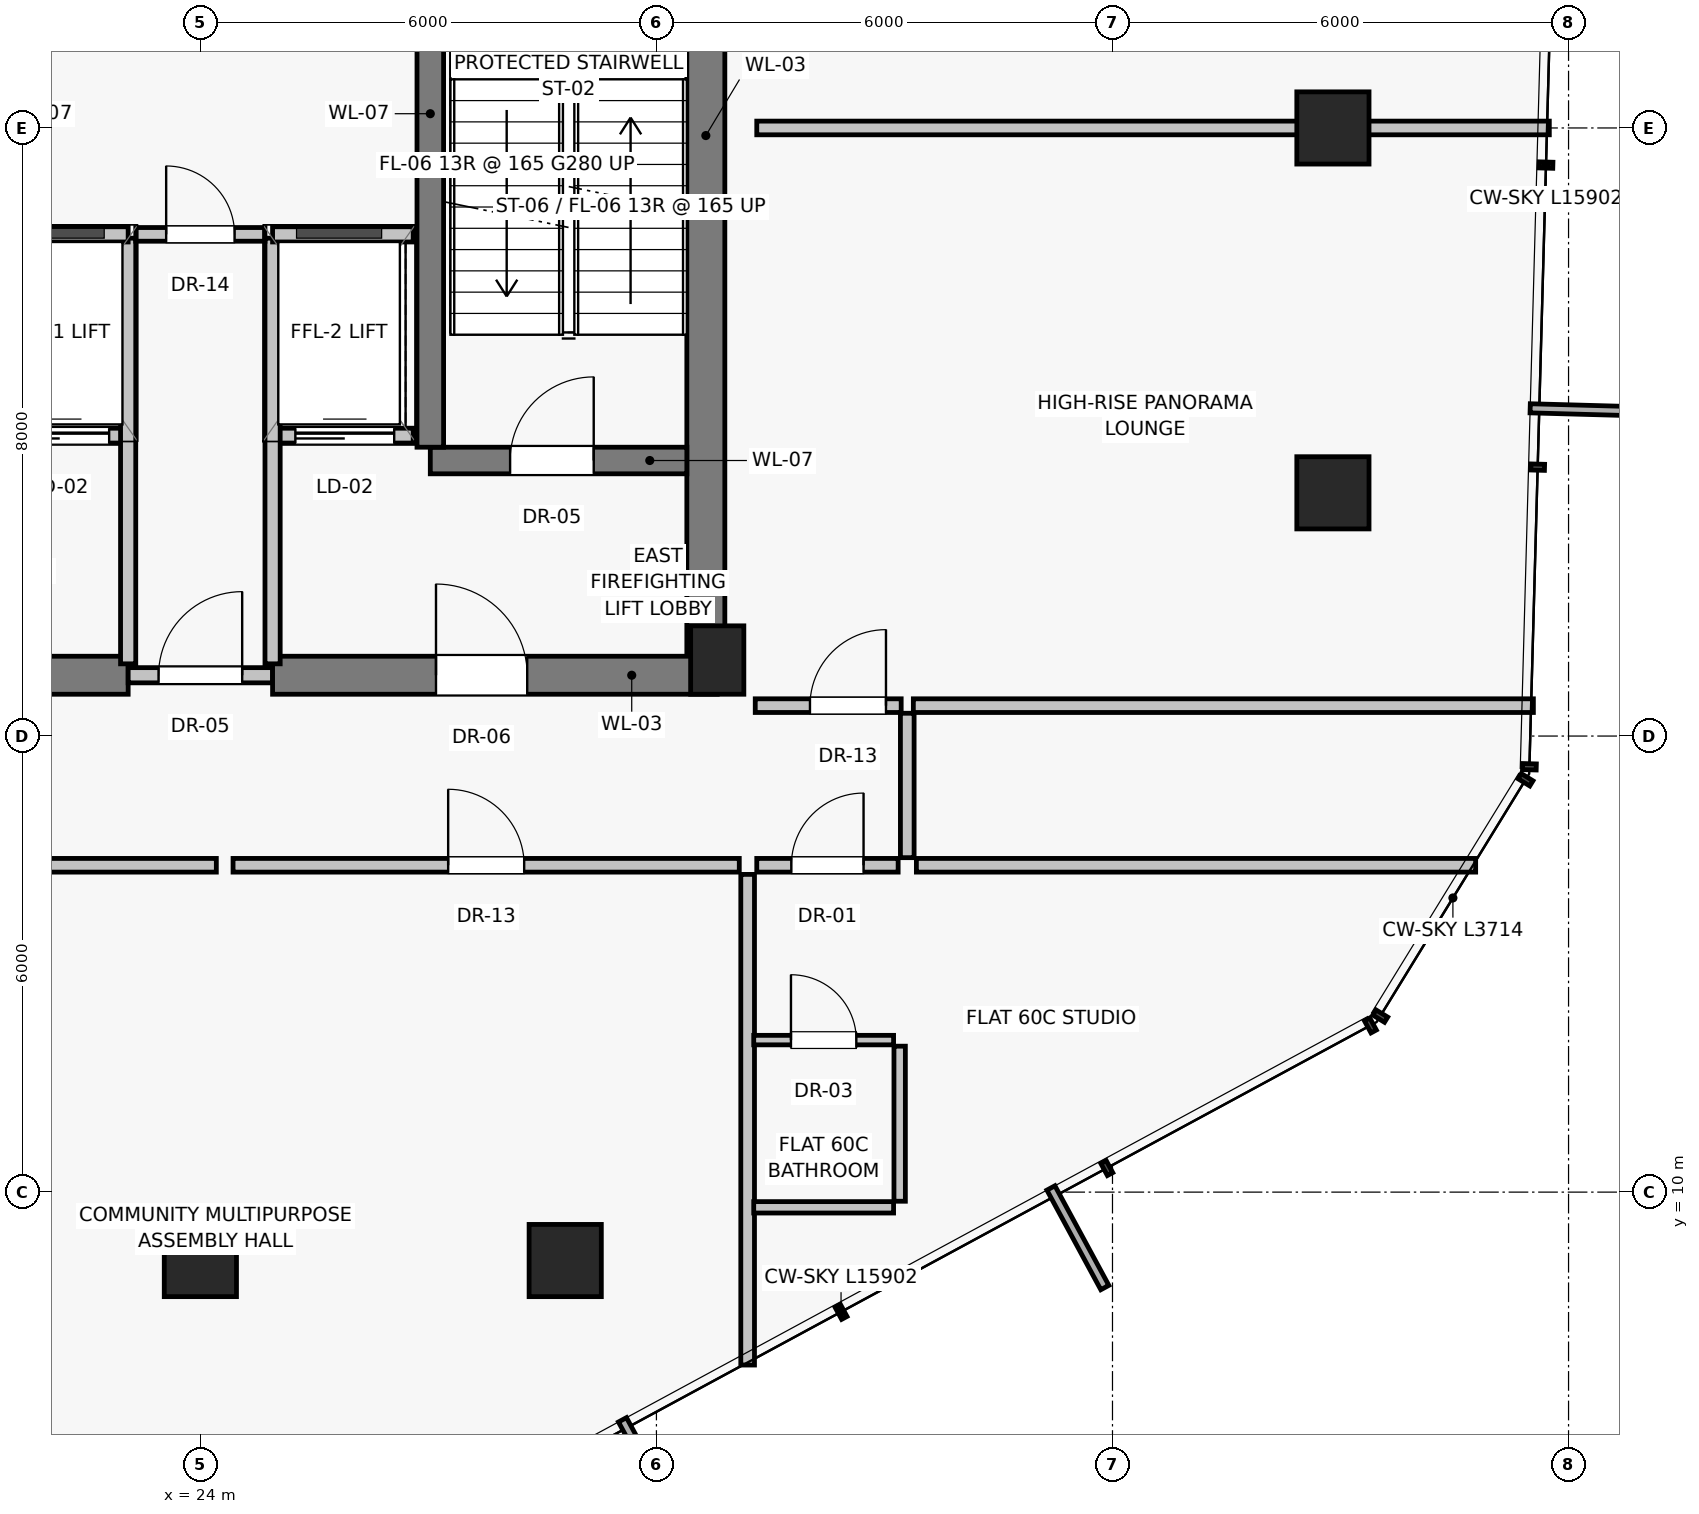
"""IFC4 building model, lengths in metres.
Left out: names, types, materials, properties, quantities, classifications, styles, units other than length and angle.
Written with IfcOpenShell. Run it as: python <this file> out.ifc"""

import sys

from ifc_helpers import new_model, si_unit, direction, frame, frame_2d, origin, origin_2d, place, context, subcontext, project, spatial, rectangle, extrude, source, transform, mapped, element, fill, save


model = new_model("IFC4")
c1 = context("Model", 3, precision=1e-05, world=origin(), true_north=direction((0.0, 1.0)))
c2 = subcontext(c1, "Body", "Model", "MODEL_VIEW")
j1 = project(units=[si_unit("LENGTHUNIT", "METRE"), si_unit("PLANEANGLEUNIT", "RADIAN")], contexts=[c1])
p1 = place(None, origin())
s1 = spatial("IfcSite", under=j1, at=p1, CompositionType="ELEMENT")
p2 = place(p1, origin())
s2 = spatial("IfcBuilding", under=s1, at=p2, CompositionType="ELEMENT")
p3 = place(p2, frame((0.0, 0.0, 211.35)))
s3 = spatial("IfcBuildingStorey", under=s2, at=p3, CompositionType="ELEMENT", Elevation=211.35)
p4 = place(p3, frame((30.8, 17.0, 0.0), z_axis=(0.0, 0.0, 1.0), x_axis=(1.0, 0.0, 0.0)))
e1 = element("IfcColumn", 1, at=p4, inside=s3, PredefinedType="PILASTER", context=c2, shape_type="SweptSolid", body=[
    extrude(rectangle(XDim=0.7, YDim=0.9, at=origin_2d()), origin(), (0.0, 0.0, 1.0), 4.3),
])
for number, where, z_axis, x_axis in (
    (2, (38.9, 19.2, 0.0), (0.0, 0.0, 1.0), (1.0, 0.0, 0.0)),
    (3, (38.9, 24.0, 0.0), (0.0, 0.0, 1.0), (1.0, 0.0, 0.0)),
    (4, (24.0, 9.1, 0.0), (0.0, 0.0, 1.0), (1.0, 0.0, 0.0)),
    (5, (28.8, 9.1, 0.0), (0.0, 0.0, 1.0), (1.0, 0.0, 0.0)),
):
    element("IfcColumn", number, at=place(p3, frame(where, z_axis=z_axis, x_axis=x_axis)), inside=s3, PredefinedType="COLUMN", context=c2, shape_type="SweptSolid", body=[
        extrude(rectangle(XDim=0.95, YDim=0.95, at=origin_2d()), origin(), (0.0, 0.0, 1.0), 4.3),
    ])
p5 = place(p3, frame((30.65, 16.8, 0.0), z_axis=(0.0, 0.0, 1.0), x_axis=(0.0, 1.0, 0.0)))
e6 = element("IfcWall", 6, at=p5, inside=s3, PredefinedType="SHEAR", context=c2, shape_type="SweptSolid", body=[
    extrude(rectangle(XDim=14.2, YDim=0.5, at=frame_2d((7.1, 0.0))), origin(), (0.0, 0.0, 1.0), 4.065),
])
p6 = place(p3, frame((17.2, 16.8, 0.0), z_axis=(0.0, 0.0, 1.0), x_axis=(1.0, 0.0, 0.0)))
e7 = element("IfcWall", 7, at=p6, inside=s3, PredefinedType="SHEAR", context=c2, shape_type="SweptSolid", body=[
    extrude(rectangle(XDim=5.85, YDim=0.5, at=frame_2d((2.925, 0.0))), origin(), (0.0, 0.0, 1.0), 4.065),
])
p7 = place(p6, frame((1.15, 0.0, 0.0)))
e8 = element("IfcOpeningElement", 8, at=p7, cuts=e7, PredefinedType="OPENING", context=c2, shape_type="SweptSolid", body=[
    extrude(rectangle(XDim=1.2, YDim=2.03, at=frame_2d((0.6, 1.015))), frame((0.0, 0.26, 0.0), z_axis=(0.0, -1.0, 0.0), x_axis=(1.0, 0.0, 0.0)), (0.0, 0.0, 1.0), 0.52),
])
p8 = place(p3, frame((23.05, 16.8, 0.0), z_axis=(0.0, 0.0, 1.0), x_axis=(1.0, 0.0, 0.0)))
e9 = element("IfcWall", 9, at=p8, inside=s3, PredefinedType="SOLIDWALL", context=c2, shape_type="SweptSolid", body=[
    extrude(rectangle(XDim=1.9, YDim=0.2, at=frame_2d((0.95, 0.0))), origin(), (0.0, 0.0, 1.0), 3.215),
])
p9 = place(p8, frame((0.4, 0.0, 0.0)))
e10 = element("IfcOpeningElement", 10, at=p9, cuts=e9, PredefinedType="OPENING", context=c2, shape_type="SweptSolid", body=[
    extrude(rectangle(XDim=1.1, YDim=2.03, at=frame_2d((0.55, 1.015))), frame((0.0, 0.11, 0.0), z_axis=(0.0, -1.0, 0.0), x_axis=(1.0, 0.0, 0.0)), (0.0, 0.0, 1.0), 0.22),
])
p10 = place(p3, frame((24.95, 16.8, 0.0), z_axis=(0.0, 0.0, 1.0), x_axis=(1.0, 0.0, 0.0)))
e11 = element("IfcWall", 11, at=p10, inside=s3, PredefinedType="SHEAR", context=c2, shape_type="SweptSolid", body=[
    extrude(rectangle(XDim=5.85, YDim=0.5, at=frame_2d((2.925, 0.0))), origin(), (0.0, 0.0, 1.0), 4.065),
])
p11 = place(p10, frame((2.15, 0.0, 0.0)))
e12 = element("IfcOpeningElement", 12, at=p11, cuts=e11, PredefinedType="OPENING", context=c2, shape_type="SweptSolid", body=[
    extrude(rectangle(XDim=1.2, YDim=2.03, at=frame_2d((0.6, 1.015))), frame((0.0, 0.26, 0.0), z_axis=(0.0, -1.0, 0.0), x_axis=(1.0, 0.0, 0.0)), (0.0, 0.0, 1.0), 0.52),
])
p12 = place(p3, frame((21.2, 19.95, 0.0), z_axis=(0.0, 0.0, 1.0), x_axis=(1.0, 0.0, 0.0)))
e13 = element("IfcWall", 13, at=p12, inside=s3, PredefinedType="SOLIDWALL", context=c2, shape_type="SweptSolid", body=[
    extrude(rectangle(XDim=1.85, YDim=0.2, at=frame_2d((0.925, 0.0))), origin(), (0.0, 0.0, 1.0), 4.065),
])
p13 = place(p12, frame((0.3, 0.0, 0.0)))
e14 = element("IfcOpeningElement", 14, at=p13, cuts=e13, PredefinedType="OPENING", context=c2, shape_type="SweptSolid", body=[
    extrude(rectangle(XDim=1.3, YDim=2.25, at=frame_2d((0.65, 1.125))), frame((0.0, 0.11, 0.0), z_axis=(0.0, -1.0, 0.0), x_axis=(1.0, 0.0, 0.0)), (0.0, 0.0, 1.0), 0.22),
])
p14 = place(p3, frame((24.95, 19.95, 0.0), z_axis=(0.0, 0.0, 1.0), x_axis=(1.0, 0.0, 0.0)))
e15 = element("IfcWall", 15, at=p14, inside=s3, PredefinedType="SOLIDWALL", context=c2, shape_type="SweptSolid", body=[
    extrude(rectangle(XDim=1.85, YDim=0.2, at=frame_2d((0.925, 0.0))), origin(), (0.0, 0.0, 1.0), 4.065),
])
p15 = place(p14, frame((0.3, 0.0, 0.0)))
e16 = element("IfcOpeningElement", 16, at=p15, cuts=e15, PredefinedType="OPENING", context=c2, shape_type="SweptSolid", body=[
    extrude(rectangle(XDim=1.3, YDim=2.25, at=frame_2d((0.65, 1.125))), frame((0.0, 0.11, 0.0), z_axis=(0.0, -1.0, 0.0), x_axis=(1.0, 0.0, 0.0)), (0.0, 0.0, 1.0), 0.22),
])
p16 = place(p3, frame((27.025, 19.625, 0.0), z_axis=(0.0, 0.0, 1.0), x_axis=(1.0, 0.0, 0.0)))
e17 = element("IfcWall", 17, at=p16, inside=s3, PredefinedType="SHEAR", context=c2, shape_type="SweptSolid", body=[
    extrude(rectangle(XDim=3.375, YDim=0.35, at=frame_2d((1.688, 0.0))), origin(), (0.0, 0.0, 1.0), 4.065),
])
p17 = place(p16, frame((1.05, 0.0, 0.0)))
e18 = element("IfcOpeningElement", 18, at=p17, cuts=e17, PredefinedType="OPENING", context=c2, shape_type="SweptSolid", body=[
    extrude(rectangle(XDim=1.1, YDim=2.03, at=frame_2d((0.55, 1.015))), frame((0.0, 0.185, 0.0), z_axis=(0.0, -1.0, 0.0), x_axis=(1.0, 0.0, 0.0)), (0.0, 0.0, 1.0), 0.37),
])
p18 = place(p3, frame((27.025, 19.8, 0.0), z_axis=(0.0, 0.0, 1.0), x_axis=(0.0, 1.0, 0.0)))
e19 = element("IfcWall", 19, at=p18, inside=s3, PredefinedType="SHEAR", context=c2, shape_type="SweptSolid", body=[
    extrude(rectangle(XDim=8.775, YDim=0.35, at=frame_2d((4.387, 0.0))), origin(), (0.0, 0.0, 1.0), 4.065),
])
for number, where, z_axis, x_axis in (
    (20, (23.05, 16.95, 0.0), (0.0, 0.0, 1.0), (0.0, 1.0, 0.0)),
    (21, (24.95, 16.95, 0.0), (0.0, 0.0, 1.0), (0.0, 1.0, 0.0)),
):
    element("IfcWall", number, at=place(p3, frame(where, z_axis=z_axis, x_axis=x_axis)), inside=s3, PredefinedType="SOLIDWALL", context=c2, shape_type="SweptSolid", body=[
        extrude(rectangle(XDim=5.6, YDim=0.2, at=frame_2d((2.8, 0.0))), origin(), (0.0, 0.0, 1.0), 4.065),
    ])
for number, where, z_axis, x_axis in (
    (22, (21.2, 22.6, 0.0), (0.0, 0.0, 1.0), (1.0, 0.0, 0.0)),
    (23, (24.95, 22.6, 0.0), (0.0, 0.0, 1.0), (1.0, 0.0, 0.0)),
):
    element("IfcWall", number, at=place(p3, frame(where, z_axis=z_axis, x_axis=x_axis)), inside=s3, PredefinedType="SOLIDWALL", context=c2, shape_type="SweptSolid", body=[
        extrude(rectangle(XDim=1.85, YDim=0.2, at=frame_2d((0.925, 0.0))), origin(), (0.0, 0.0, 1.0), 4.065),
    ])
p19 = place(p3, frame((23.15, 22.6, 0.0), z_axis=(0.0, 0.0, 1.0), x_axis=(1.0, 0.0, 0.0)))
e24 = element("IfcWall", 24, at=p19, inside=s3, PredefinedType="PARTITIONING", context=c2, shape_type="SweptSolid", body=[
    extrude(rectangle(XDim=1.7, YDim=0.18, at=frame_2d((0.85, 0.0))), origin(), (0.0, 0.0, 1.0), 4.065),
])
p20 = place(p19, frame((0.4, 0.0, 0.0)))
e25 = element("IfcOpeningElement", 25, at=p20, cuts=e24, PredefinedType="OPENING", context=c2, shape_type="SweptSolid", body=[
    extrude(rectangle(XDim=0.9, YDim=2.01, at=frame_2d((0.45, 1.005))), frame((0.0, 0.1, 0.0), z_axis=(0.0, -1.0, 0.0), x_axis=(1.0, 0.0, 0.0)), (0.0, 0.0, 1.0), 0.2),
])
p21 = place(p3, frame((31.2, 14.18, 0.0), z_axis=(0.0, 0.0, 1.0), x_axis=(0.0, -1.0, 0.0)))
e26 = element("IfcWall", 26, at=p21, inside=s3, PredefinedType="PARTITIONING", context=c2, shape_type="SweptSolid", body=[
    extrude(rectangle(XDim=6.455, YDim=0.18, at=frame_2d((3.228, 0.0))), origin(), (0.0, 0.0, 1.0), 4.065),
])
p22 = place(p3, frame((15.31, 14.3, 0.0), z_axis=(0.0, 0.0, 1.0), x_axis=(1.0, 0.0, 0.0)))
e27 = element("IfcWall", 27, at=p22, inside=s3, PredefinedType="PARTITIONING", context=c2, shape_type="SweptSolid", body=[
    extrude(rectangle(XDim=8.9, YDim=0.18, at=frame_2d((4.45, 0.0))), origin(), (0.0, 0.0, 1.0), 4.065),
])
p23 = place(p22, frame((3.55, 0.0, 0.0)))
e28 = element("IfcOpeningElement", 28, at=p23, cuts=e27, PredefinedType="OPENING", context=c2, shape_type="SweptSolid", body=[
    extrude(rectangle(XDim=1.8, YDim=2.25, at=frame_2d((0.9, 1.125))), frame((0.0, 0.1, 0.0), z_axis=(0.0, -1.0, 0.0), x_axis=(1.0, 0.0, 0.0)), (0.0, 0.0, 1.0), 0.2),
])
p24 = place(p3, frame((24.43, 14.3, 0.0), z_axis=(0.0, 0.0, 1.0), x_axis=(1.0, 0.0, 0.0)))
e29 = element("IfcWall", 29, at=p24, inside=s3, PredefinedType="PARTITIONING", context=c2, shape_type="SweptSolid", body=[
    extrude(rectangle(XDim=6.66, YDim=0.18, at=frame_2d((3.33, 0.0))), origin(), (0.0, 0.0, 1.0), 4.065),
])
p25 = place(p24, frame((2.83, 0.0, 0.0)))
e30 = element("IfcOpeningElement", 30, at=p25, cuts=e29, PredefinedType="OPENING", context=c2, shape_type="SweptSolid", body=[
    extrude(rectangle(XDim=1.0, YDim=2.01, at=frame_2d((0.5, 1.005))), frame((0.0, 0.1, 0.0), z_axis=(0.0, -1.0, 0.0), x_axis=(1.0, 0.0, 0.0)), (0.0, 0.0, 1.0), 0.2),
])
p26 = place(p3, frame((31.32, 24.0, 0.0), z_axis=(0.0, 0.0, 1.0), x_axis=(1.0, 0.0, 0.0)))
e31 = element("IfcWall", 31, at=p26, inside=s3, PredefinedType="PARTITIONING", context=c2, shape_type="SweptSolid", body=[
    extrude(rectangle(XDim=10.427, YDim=0.18, at=frame_2d((5.213, 0.0))), origin(), (0.0, 0.0, 1.0), 4.065),
])
p27 = place(p3, frame((33.3, 14.4, 0.0), z_axis=(0.0, 0.0, 1.0), x_axis=(0.0, 1.0, 0.0)))
e32 = element("IfcWall", 32, at=p27, inside=s3, PredefinedType="PARTITIONING", context=c2, shape_type="SweptSolid", body=[
    extrude(rectangle(XDim=1.9, YDim=0.18, at=frame_2d((0.95, 0.0))), origin(), (0.0, 0.0, 1.0), 4.065),
])
p28 = place(p3, frame((31.3, 16.4, 0.0), z_axis=(0.0, 0.0, 1.0), x_axis=(1.0, 0.0, 0.0)))
e33 = element("IfcWall", 33, at=p28, inside=s3, PredefinedType="PARTITIONING", context=c2, shape_type="SweptSolid", body=[
    extrude(rectangle(XDim=1.92, YDim=0.18, at=frame_2d((0.96, 0.0))), origin(), (0.0, 0.0, 1.0), 4.065),
])
p29 = place(p28, frame((0.72, 0.0, 0.0)))
e34 = element("IfcOpeningElement", 34, at=p29, cuts=e33, PredefinedType="OPENING", context=c2, shape_type="SweptSolid", body=[
    extrude(rectangle(XDim=1.0, YDim=2.01, at=frame_2d((0.5, 1.005))), frame((0.0, 0.1, 0.0), z_axis=(0.0, -1.0, 0.0), x_axis=(1.0, 0.0, 0.0)), (0.0, 0.0, 1.0), 0.2),
])
p30 = place(p3, frame((33.38, 16.4, 0.0), z_axis=(0.0, 0.0, 1.0), x_axis=(1.0, 0.0, 0.0)))
e35 = element("IfcWall", 35, at=p30, inside=s3, PredefinedType="PARTITIONING", context=c2, shape_type="SweptSolid", body=[
    extrude(rectangle(XDim=8.157, YDim=0.18, at=frame_2d((4.079, 0.0))), origin(), (0.0, 0.0, 1.0), 4.065),
])
p31 = place(p3, frame((33.42, 14.3, 0.0), z_axis=(0.0, 0.0, 1.0), x_axis=(1.0, 0.0, 0.0)))
e36 = element("IfcWall", 36, at=p31, inside=s3, PredefinedType="PARTITIONING", context=c2, shape_type="SweptSolid", body=[
    extrude(rectangle(XDim=7.358, YDim=0.18, at=frame_2d((3.679, 0.0))), origin(), (0.0, 0.0, 1.0), 4.065),
])
p32 = place(p3, frame((31.32, 14.3, 0.0), z_axis=(0.0, 0.0, 1.0), x_axis=(1.0, 0.0, 0.0)))
e37 = element("IfcWall", 37, at=p32, inside=s3, PredefinedType="PARTITIONING", context=c2, shape_type="SweptSolid", body=[
    extrude(rectangle(XDim=1.86, YDim=0.18, at=frame_2d((0.93, 0.0))), origin(), (0.0, 0.0, 1.0), 4.065),
])
p33 = place(p32, frame((0.455, 0.0, 0.0)))
e38 = element("IfcOpeningElement", 38, at=p33, cuts=e37, PredefinedType="OPENING", context=c2, shape_type="SweptSolid", body=[
    extrude(rectangle(XDim=0.95, YDim=2.02, at=frame_2d((0.475, 1.01))), frame((0.0, 0.1, 0.0), z_axis=(0.0, -1.0, 0.0), x_axis=(1.0, 0.0, 0.0)), (0.0, 0.0, 1.0), 0.2),
])
p34 = place(p3, frame((31.28, 12.0, 0.0), z_axis=(0.0, 0.0, 1.0), x_axis=(1.0, 0.0, 0.0)))
e39 = element("IfcWall", 39, at=p34, inside=s3, PredefinedType="PARTITIONING", context=c2, shape_type="SweptSolid", body=[
    extrude(rectangle(XDim=1.84, YDim=0.125, at=frame_2d((0.92, 0.0))), origin(), (0.0, 0.0, 1.0), 4.065),
])
p35 = place(p34, frame((0.49, 0.0, 0.0)))
e40 = element("IfcOpeningElement", 40, at=p35, cuts=e39, PredefinedType="OPENING", context=c2, shape_type="SweptSolid", body=[
    extrude(rectangle(XDim=0.86, YDim=2.01, at=frame_2d((0.43, 1.005))), frame((0.0, 0.073, 0.0), z_axis=(0.0, -1.0, 0.0), x_axis=(1.0, 0.0, 0.0)), (0.0, 0.0, 1.0), 0.145),
])
p36 = place(p3, frame((31.28, 9.8, 0.0), z_axis=(0.0, 0.0, 1.0), x_axis=(1.0, 0.0, 0.0)))
e41 = element("IfcWall", 41, at=p36, inside=s3, PredefinedType="PARTITIONING", context=c2, shape_type="SweptSolid", body=[
    extrude(rectangle(XDim=1.84, YDim=0.15, at=frame_2d((0.92, 0.0))), origin(), (0.0, 0.0, 1.0), 4.065),
])
p37 = place(p3, frame((33.2, 9.88, 0.0), z_axis=(0.0, 0.0, 1.0), x_axis=(0.0, 1.0, 0.0)))
e42 = element("IfcWall", 42, at=p37, inside=s3, PredefinedType="PARTITIONING", context=c2, shape_type="SweptSolid", body=[
    extrude(rectangle(XDim=2.04, YDim=0.15, at=frame_2d((1.02, 0.0))), origin(), (0.0, 0.0, 1.0), 4.065),
])
m1 = source(origin(), c2, "Body", "SweptSolid", [
    extrude(rectangle(XDim=1.1, YDim=2.03, at=frame_2d((0.55, 1.015))), frame((0.0, 0.025, 0.0), z_axis=(0.0, -1.0, 0.0), x_axis=(1.0, 0.0, 0.0)), (0.0, 0.0, 1.0), 0.05),
])
p38 = place(p9, origin())
e43 = element("IfcDoor", 43, at=p38, inside=s3, OperationType="SINGLE_SWING_RIGHT", PredefinedType="DOOR", context=c2, shape_type="MappedRepresentation", body=[
    mapped(m1, transform((0.0, 0.0, 0.0), scale=1.0)),
])
fill(e10, e43)
m2 = source(origin(), c2, "Body", "SweptSolid", [
    extrude(rectangle(XDim=1.2, YDim=2.03, at=frame_2d((0.6, 1.015))), frame((0.0, 0.025, 0.0), z_axis=(0.0, -1.0, 0.0), x_axis=(1.0, 0.0, 0.0)), (0.0, 0.0, 1.0), 0.05),
])
p39 = place(p11, origin())
e44 = element("IfcDoor", 44, at=p39, inside=s3, OperationType="SINGLE_SWING_LEFT", PredefinedType="DOOR", context=c2, shape_type="MappedRepresentation", body=[
    mapped(m2, transform((0.0, 0.0, 0.0), scale=1.0)),
])
fill(e12, e44)
m3 = source(origin(), c2, "Body", "SweptSolid", [
    extrude(rectangle(XDim=1.3, YDim=2.25, at=frame_2d((0.65, 1.125))), frame((0.0, 0.025, 0.0), z_axis=(0.0, -1.0, 0.0), x_axis=(1.0, 0.0, 0.0)), (0.0, 0.0, 1.0), 0.05),
])
p40 = place(p13, origin())
e45 = element("IfcDoor", 45, at=p40, inside=s3, OperationType="SLIDING_TO_LEFT", PredefinedType="DOOR", context=c2, shape_type="MappedRepresentation", body=[
    mapped(m3, transform((0.0, 0.0, 0.0), scale=1.0)),
])
fill(e14, e45)
p41 = place(p15, origin())
e46 = element("IfcDoor", 46, at=p41, inside=s3, OperationType="SLIDING_TO_LEFT", PredefinedType="DOOR", context=c2, shape_type="MappedRepresentation", body=[
    mapped(m3, transform((0.0, 0.0, 0.0), scale=1.0)),
])
fill(e16, e46)
p42 = place(p17, origin())
e47 = element("IfcDoor", 47, at=p42, inside=s3, OperationType="SINGLE_SWING_RIGHT", PredefinedType="DOOR", context=c2, shape_type="MappedRepresentation", body=[
    mapped(m1, transform((0.0, 0.0, 0.0), scale=1.0)),
])
fill(e18, e47)
m4 = source(origin(), c2, "Body", "SweptSolid", [
    extrude(rectangle(XDim=0.9, YDim=2.01, at=frame_2d((0.45, 1.005))), frame((0.0, 0.025, 0.0), z_axis=(0.0, -1.0, 0.0), x_axis=(1.0, 0.0, 0.0)), (0.0, 0.0, 1.0), 0.05),
])
p43 = place(p20, origin())
e48 = element("IfcDoor", 48, at=p43, inside=s3, OperationType="SINGLE_SWING_LEFT", PredefinedType="DOOR", context=c2, shape_type="MappedRepresentation", body=[
    mapped(m4, transform((0.0, 0.0, 0.0), scale=1.0)),
])
fill(e25, e48)
m5 = source(origin(), c2, "Body", "SweptSolid", [
    extrude(rectangle(XDim=1.0, YDim=2.01, at=frame_2d((0.5, 1.005))), frame((0.0, 0.025, 0.0), z_axis=(0.0, -1.0, 0.0), x_axis=(1.0, 0.0, 0.0)), (0.0, 0.0, 1.0), 0.05),
])
p44 = place(p25, origin())
e49 = element("IfcDoor", 49, at=p44, inside=s3, OperationType="SINGLE_SWING_LEFT", PredefinedType="DOOR", context=c2, shape_type="MappedRepresentation", body=[
    mapped(m5, transform((0.0, 0.0, 0.0), scale=1.0)),
])
fill(e30, e49)
p45 = place(p29, origin())
e50 = element("IfcDoor", 50, at=p45, inside=s3, OperationType="SINGLE_SWING_RIGHT", PredefinedType="DOOR", context=c2, shape_type="MappedRepresentation", body=[
    mapped(m5, transform((0.0, 0.0, 0.0), scale=1.0)),
])
fill(e34, e50)
m6 = source(origin(), c2, "Body", "SweptSolid", [
    extrude(rectangle(XDim=0.95, YDim=2.02, at=frame_2d((0.475, 1.01))), frame((0.0, 0.025, 0.0), z_axis=(0.0, -1.0, 0.0), x_axis=(1.0, 0.0, 0.0)), (0.0, 0.0, 1.0), 0.05),
])
p46 = place(p33, origin())
e51 = element("IfcDoor", 51, at=p46, inside=s3, OperationType="SINGLE_SWING_RIGHT", PredefinedType="DOOR", context=c2, shape_type="MappedRepresentation", body=[
    mapped(m6, transform((0.0, 0.0, 0.0), scale=1.0)),
])
fill(e38, e51)
m7 = source(origin(), c2, "Body", "SweptSolid", [
    extrude(rectangle(XDim=0.86, YDim=2.01, at=frame_2d((0.43, 1.005))), frame((0.0, 0.025, 0.0), z_axis=(0.0, -1.0, 0.0), x_axis=(1.0, 0.0, 0.0)), (0.0, 0.0, 1.0), 0.05),
])
p47 = place(p35, origin())
e52 = element("IfcDoor", 52, at=p47, inside=s3, OperationType="SINGLE_SWING_LEFT", PredefinedType="DOOR", context=c2, shape_type="MappedRepresentation", body=[
    mapped(m7, transform((0.0, 0.0, 0.0), scale=1.0)),
])
fill(e40, e52)
save(model, sys.argv[1])
